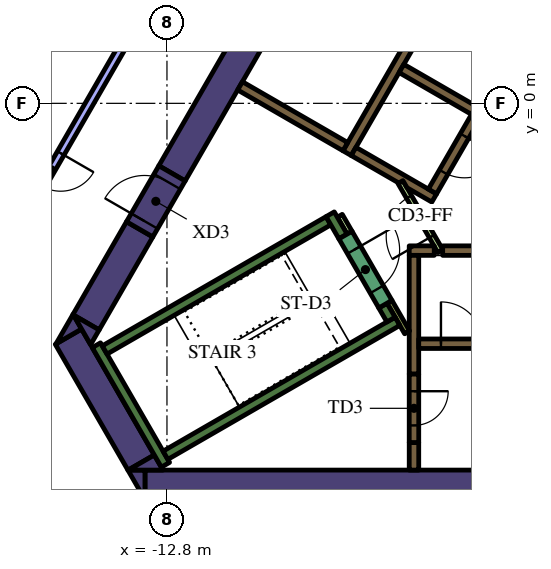
"""IFC4 building model, lengths in metres.
Left out: names, types, materials, properties, quantities, classifications, styles, units other than length and angle.
Written with IfcOpenShell. Run it as: python <this file> out.ifc"""

import sys

from ifc_helpers import new_model, si_unit, direction, frame, frame_2d, origin, place, context, subcontext, project, spatial, polyline, rectangle, outline, extrude, element, fill, save


model = new_model("IFC4")
c1 = context("Model", 3, precision=1e-05, world=origin(), true_north=direction((0.0, 1.0)))
c2 = subcontext(c1, "Body", "Model", "MODEL_VIEW")
j1 = project(units=[si_unit("LENGTHUNIT", "METRE"), si_unit("PLANEANGLEUNIT", "RADIAN")], contexts=[c1])
p1 = place(None, origin())
s1 = spatial("IfcSite", under=j1, at=p1, CompositionType="ELEMENT")
p2 = place(p1, origin())
s2 = spatial("IfcBuilding", under=s1, at=p2, CompositionType="ELEMENT")
p3 = place(p2, frame((0.0, 0.0, 166.8)))
s3 = spatial("IfcBuildingStorey", under=s2, at=p3, CompositionType="ELEMENT", Elevation=166.8)
p4 = place(p3, frame((-13.378, -10.05, 0.0), z_axis=(0.0, 0.0, 1.0), x_axis=(1.0, 0.0, 0.0)))
e1 = element("IfcWall", 1, at=p4, inside=s3, PredefinedType="SOLIDWALL", context=c2, shape_type="SweptSolid", body=[
    extrude(rectangle(XDim=22.282, YDim=0.8, at=frame_2d((11.141, 0.0))), origin(), (0.0, 0.0, 1.0), 4.2),
])
p5 = place(p3, origin())
e2 = element("IfcWall", 2, at=p5, inside=s3, PredefinedType="SOLIDWALL", context=c2, shape_type="SweptSolid", body=[
    extrude(outline(polyline([(-13.828, -9.65), (-13.38, -9.65), (-13.38, -10.426), (-13.828, -9.65)])), origin(), (0.0, 0.0, 1.0), 4.2),
])
p6 = place(p3, frame((-15.392, -6.14, 0.0), z_axis=(0.0, 0.0, 1.0), x_axis=(0.499984020225, -0.866034629516, 0.0)))
e3 = element("IfcWall", 3, at=p6, inside=s3, PredefinedType="SOLIDWALL", context=c2, shape_type="SweptSolid", body=[
    extrude(rectangle(XDim=3.824, YDim=0.8, at=frame_2d((1.912, 0.0))), origin(), (0.0, 0.0, 1.0), 4.2),
])
e4 = element("IfcWall", 4, at=p5, inside=s3, PredefinedType="SOLIDWALL", context=c2, shape_type="SweptSolid", body=[
    extrude(outline(polyline([(-15.047, -5.938), (-15.719, -6.326), (-15.271, -5.55), (-15.047, -5.938)])), origin(), (0.0, 0.0, 1.0), 4.2),
])
e5 = element("IfcWall", 5, at=p5, inside=s3, PredefinedType="SOLIDWALL", context=c2, shape_type="SweptSolid", body=[
    extrude(outline(polyline([(-12.904, -9.65), (-13.82, -9.65), (-13.133, -9.253), (-12.904, -9.65)])), origin(), (0.0, 0.0, 1.0), 4.2),
])
p7 = place(p3, frame((-13.518, -3.314, 0.0), z_axis=(0.0, 0.0, 1.0), x_axis=(-0.499969377405, -0.866043083026, 0.0)))
e6 = element("IfcWall", 6, at=p7, inside=s3, PredefinedType="SOLIDWALL", context=c2, shape_type="SweptSolid", body=[
    extrude(rectangle(XDim=2.824, YDim=0.8, at=frame_2d((1.412, 0.0))), origin(), (0.0, 0.0, 1.0), 4.2),
])
e7 = element("IfcWall", 7, at=p5, inside=s3, PredefinedType="SOLIDWALL", context=c2, shape_type="SweptSolid", body=[
    extrude(outline(polyline([(-14.809, -6.35), (-15.257, -5.574), (-14.585, -5.962), (-14.809, -6.35)])), origin(), (0.0, 0.0, 1.0), 4.2),
])
p8 = place(p3, frame((-12.668, -1.842, 0.0), z_axis=(0.0, 0.0, 1.0), x_axis=(0.500003640647, 0.866023301845, 0.0)))
e8 = element("IfcWall", 8, at=p8, inside=s3, PredefinedType="SOLIDWALL", context=c2, shape_type="SweptSolid", body=[
    extrude(rectangle(XDim=15.858, YDim=0.8, at=frame_2d((7.929, 0.0))), origin(), (0.0, 0.0, 1.0), 4.2),
])
p9 = place(p3, frame((-12.84, -9.511, 0.0), z_axis=(0.0, 0.0, 1.0), x_axis=(-0.499997733992, 0.866026712061, 0.0)))
e9 = element("IfcWall", 9, at=p9, inside=s3, PredefinedType="SOLIDWALL", context=c2, shape_type="SweptSolid", body=[
    extrude(rectangle(XDim=3.634, YDim=0.25, at=frame_2d((1.817, 0.0))), origin(), (0.0, 0.0, 1.0), 4.2),
])
p10 = place(p3, frame((-14.44, -6.49, 0.0), z_axis=(0.0, 0.0, 1.0), x_axis=(0.866022966069, 0.500004222222, 0.0)))
e10 = element("IfcWall", 10, at=p10, inside=s3, PredefinedType="SOLIDWALL", context=c2, shape_type="SweptSolid", body=[
    extrude(rectangle(XDim=6.8, YDim=0.25, at=frame_2d((3.4, 0.0))), origin(), (0.0, 0.0, 1.0), 4.2),
])
p11 = place(p3, frame((-8.168, -3.503, 0.0), z_axis=(0.0, 0.0, 1.0), x_axis=(-0.499952099219, 0.866053057547, 0.0)))
e11 = element("IfcWall", 11, at=p11, inside=s3, PredefinedType="SOLIDWALL", context=c2, shape_type="SweptSolid", body=[
    extrude(rectangle(XDim=0.675, YDim=0.25, at=frame_2d((0.337, 0.0))), origin(), (0.0, 0.0, 1.0), 4.2),
])
p12 = place(p3, frame((-12.84, -9.261, 0.0), z_axis=(0.0, 0.0, 1.0), x_axis=(0.866016039709, 0.500016218704, 0.0)))
e12 = element("IfcWall", 12, at=p12, inside=s3, PredefinedType="SOLIDWALL", context=c2, shape_type="SweptSolid", body=[
    extrude(rectangle(XDim=7.05, YDim=0.25, at=frame_2d((3.525, 0.0))), origin(), (0.0, 0.0, 1.0), 4.2),
])
p13 = place(p3, frame((-6.905, -5.69, 0.0), z_axis=(0.0, 0.0, 1.0), x_axis=(-0.500402024738, 0.865793170242, 0.0)))
e13 = element("IfcWall", 13, at=p13, inside=s3, PredefinedType="SOLIDWALL", context=c2, shape_type="SweptSolid", body=[
    extrude(rectangle(XDim=0.425, YDim=0.25, at=frame_2d((0.212, 0.0))), origin(), (0.0, 0.0, 1.0), 4.2),
])
p14 = place(p3, frame((-6.3, -8.925, 0.0), z_axis=(0.0, 0.0, 1.0), x_axis=(0.0, -1.0, 0.0)))
e14 = element("IfcWall", 14, at=p14, inside=s3, PredefinedType="SOLIDWALL", context=c2, shape_type="SweptSolid", body=[
    extrude(rectangle(XDim=0.725, YDim=0.25, at=frame_2d((0.363, 0.0))), origin(), (0.0, 0.0, 1.0), 4.2),
])
p15 = place(p3, frame((-5.545, -3.875, 0.0), z_axis=(0.0, 0.0, 1.0), x_axis=(1.0, 0.0, 0.0)))
e15 = element("IfcWall", 15, at=p15, inside=s3, PredefinedType="SOLIDWALL", context=c2, shape_type="SweptSolid", body=[
    extrude(rectangle(XDim=11.97, YDim=0.25, at=frame_2d((5.985, 0.0))), origin(), (0.0, 0.0, 1.0), 4.2),
])
p16 = place(p3, frame((-6.425, -3.875, 0.0), z_axis=(0.0, 0.0, 1.0), x_axis=(1.0, 0.0, 0.0)))
e16 = element("IfcWall", 16, at=p16, inside=s3, PredefinedType="SOLIDWALL", context=c2, shape_type="SweptSolid", body=[
    extrude(rectangle(XDim=0.658, YDim=0.25, at=frame_2d((0.329, 0.0))), origin(), (0.0, 0.0, 1.0), 4.2),
])
p17 = place(p3, frame((-6.3, -7.125, 0.0), z_axis=(0.0, 0.0, 1.0), x_axis=(0.0, 1.0, 0.0)))
e17 = element("IfcWall", 17, at=p17, inside=s3, PredefinedType="SOLIDWALL", context=c2, shape_type="SweptSolid", body=[
    extrude(rectangle(XDim=3.125, YDim=0.25, at=frame_2d((1.562, 0.0))), origin(), (0.0, 0.0, 1.0), 4.2),
])
p18 = place(p3, frame((-8.06, -1.311, 0.0), z_axis=(0.0, 0.0, 1.0), x_axis=(0.50000273126, 0.866023826885, 0.0)))
e18 = element("IfcWall", 18, at=p18, inside=s3, PredefinedType="SOLIDWALL", context=c2, shape_type="SweptSolid", body=[
    extrude(rectangle(XDim=10.33, YDim=0.25, at=frame_2d((5.165, 0.0))), origin(), (0.0, 0.0, 1.0), 4.2),
])
p19 = place(p3, frame((-4.724, -0.182, 0.0), z_axis=(0.0, 0.0, 1.0), x_axis=(-0.866008176907, 0.50002983664, 0.0)))
e19 = element("IfcWall", 19, at=p19, inside=s3, PredefinedType="SOLIDWALL", context=c2, shape_type="SweptSolid", body=[
    extrude(rectangle(XDim=2.2, YDim=0.25, at=frame_2d((1.1, 0.0))), origin(), (0.0, 0.0, 1.0), 4.2),
])
e20 = element("IfcWall", 20, at=p5, inside=s3, PredefinedType="SOLIDWALL", context=c2, shape_type="SweptSolid", body=[
    extrude(outline(polyline([(-5.922, -2.257), (-5.922, -2.257), (-5.705, -2.382), (-5.83, -2.598), (-6.483, -2.221), (-6.591, -2.033), (-6.591, -2.033), (-6.7, -2.096), (-7.952, -1.373), (-7.827, -1.156), (-5.922, -2.257)])), origin(), (0.0, 0.0, 1.0), 4.2),
])
p20 = place(p3, frame((-8.106, -1.14, 0.0), z_axis=(0.0, 0.0, 1.0), x_axis=(-0.866008981251, 0.500028443584, 0.0)))
e21 = element("IfcWall", 21, at=p20, inside=s3, PredefinedType="SOLIDWALL", context=c2, shape_type="SweptSolid", body=[
    extrude(rectangle(XDim=3.2, YDim=0.25, at=frame_2d((1.6, 0.0))), origin(), (0.0, 0.0, 1.0), 4.2),
])
p21 = place(p3, frame((-8.252, -2.958, 0.0), z_axis=(0.0, 0.0, 1.0), x_axis=(0.500174715838, -0.865924508047, 0.0)))
e22 = element("IfcWall", 22, at=p21, inside=s3, PredefinedType="PARTITIONING", context=c2, shape_type="SweptSolid", body=[
    extrude(rectangle(XDim=0.514, YDim=0.15, at=frame_2d((0.257, 0.0))), origin(), (0.0, 0.0, 1.0), 3.15),
])
p22 = place(p3, frame((-6.48, -6.027, 0.0), z_axis=(0.0, 0.0, 1.0), x_axis=(-0.499927229454, 0.866067413802, 0.0)))
e23 = element("IfcWall", 23, at=p22, inside=s3, PredefinedType="PARTITIONING", context=c2, shape_type="SweptSolid", body=[
    extrude(rectangle(XDim=0.929, YDim=0.15, at=frame_2d((0.464, 0.0))), origin(), (0.0, 0.0, 1.0), 4.2),
])
p23 = place(p3, frame((-6.175, -6.325, 0.0), z_axis=(0.0, 0.0, 1.0), x_axis=(1.0, 0.0, 0.0)))
e24 = element("IfcWall", 24, at=p23, inside=s3, PredefinedType="SOLIDWALL", context=c2, shape_type="SweptSolid", body=[
    extrude(rectangle(XDim=12.35, YDim=0.25, at=frame_2d((6.175, 0.0))), origin(), (0.0, 0.0, 1.0), 4.2),
])
p24 = place(p23, frame((0.585, 0.0, 0.0)))
e25 = element("IfcOpeningElement", 25, at=p24, cuts=e24, PredefinedType="OPENING", context=c2, shape_type="SweptSolid", body=[
    extrude(rectangle(XDim=1.1, YDim=2.1, at=frame_2d((0.55, 1.05))), frame((0.0, 0.135, 0.0), z_axis=(0.0, -1.0, 0.0), x_axis=(1.0, 0.0, 0.0)), (0.0, 0.0, 1.0), 0.27),
])
p25 = place(p23, frame((3.105, 0.0, 0.0)))
e26 = element("IfcOpeningElement", 26, at=p25, cuts=e24, PredefinedType="OPENING", context=c2, shape_type="SweptSolid", body=[
    extrude(rectangle(XDim=1.1, YDim=2.1, at=frame_2d((0.55, 1.05))), frame((0.0, 0.135, 0.0), z_axis=(0.0, -1.0, 0.0), x_axis=(1.0, 0.0, 0.0)), (0.0, 0.0, 1.0), 0.27),
])
p26 = place(p23, frame((5.625, 0.0, 0.0)))
e27 = element("IfcOpeningElement", 27, at=p26, cuts=e24, PredefinedType="OPENING", context=c2, shape_type="SweptSolid", body=[
    extrude(rectangle(XDim=1.1, YDim=2.1, at=frame_2d((0.55, 1.05))), frame((0.0, 0.135, 0.0), z_axis=(0.0, -1.0, 0.0), x_axis=(1.0, 0.0, 0.0)), (0.0, 0.0, 1.0), 0.27),
])
p27 = place(p23, frame((8.145, 0.0, 0.0)))
e28 = element("IfcOpeningElement", 28, at=p27, cuts=e24, PredefinedType="OPENING", context=c2, shape_type="SweptSolid", body=[
    extrude(rectangle(XDim=1.1, YDim=2.1, at=frame_2d((0.55, 1.05))), frame((0.0, 0.135, 0.0), z_axis=(0.0, -1.0, 0.0), x_axis=(1.0, 0.0, 0.0)), (0.0, 0.0, 1.0), 0.27),
])
p28 = place(p23, frame((10.665, 0.0, 0.0)))
e29 = element("IfcOpeningElement", 29, at=p28, cuts=e24, PredefinedType="OPENING", context=c2, shape_type="SweptSolid", body=[
    extrude(rectangle(XDim=1.1, YDim=2.1, at=frame_2d((0.55, 1.05))), frame((0.0, 0.135, 0.0), z_axis=(0.0, -1.0, 0.0), x_axis=(1.0, 0.0, 0.0)), (0.0, 0.0, 1.0), 0.27),
])
p29 = place(p3, frame((-0.898, 6.194, 0.0), z_axis=(0.0, 0.0, 1.0), x_axis=(-0.499996202215, -0.866027596426, 0.0)))
e30 = element("IfcWall", 30, at=p29, inside=s3, PredefinedType="SOLIDWALL", context=c2, shape_type="SweptSolid", body=[
    extrude(rectangle(XDim=9.83, YDim=0.25, at=frame_2d((4.915, 0.0))), origin(), (0.0, 0.0, 1.0), 4.2),
])
p30 = place(p29, frame((0.585, 0.0, 0.0)))
e31 = element("IfcOpeningElement", 31, at=p30, cuts=e30, PredefinedType="OPENING", context=c2, shape_type="SweptSolid", body=[
    extrude(rectangle(XDim=1.1, YDim=2.1, at=frame_2d((0.55, 1.05))), frame((0.0, 0.135, 0.0), z_axis=(0.0, -1.0, 0.0), x_axis=(1.0, 0.0, 0.0)), (0.0, 0.0, 1.0), 0.27),
])
p31 = place(p29, frame((3.105, 0.0, 0.0)))
e32 = element("IfcOpeningElement", 32, at=p31, cuts=e30, PredefinedType="OPENING", context=c2, shape_type="SweptSolid", body=[
    extrude(rectangle(XDim=1.1, YDim=2.1, at=frame_2d((0.55, 1.05))), frame((0.0, 0.135, 0.0), z_axis=(0.0, -1.0, 0.0), x_axis=(1.0, 0.0, 0.0)), (0.0, 0.0, 1.0), 0.27),
])
p32 = place(p29, frame((5.625, 0.0, 0.0)))
e33 = element("IfcOpeningElement", 33, at=p32, cuts=e30, PredefinedType="OPENING", context=c2, shape_type="SweptSolid", body=[
    extrude(rectangle(XDim=1.1, YDim=2.1, at=frame_2d((0.55, 1.05))), frame((0.0, 0.135, 0.0), z_axis=(0.0, -1.0, 0.0), x_axis=(1.0, 0.0, 0.0)), (0.0, 0.0, 1.0), 0.27),
])
p33 = place(p29, frame((8.145, 0.0, 0.0)))
e34 = element("IfcOpeningElement", 34, at=p33, cuts=e30, PredefinedType="OPENING", context=c2, shape_type="SweptSolid", body=[
    extrude(rectangle(XDim=1.1, YDim=2.1, at=frame_2d((0.55, 1.05))), frame((0.0, 0.135, 0.0), z_axis=(0.0, -1.0, 0.0), x_axis=(1.0, 0.0, 0.0)), (0.0, 0.0, 1.0), 0.27),
])
p34 = place(p3, frame((-8.103, -3.466, 0.0), z_axis=(0.0, 0.0, 1.0), x_axis=(0.500078061341, -0.865980330357, 0.0)))
e35 = element("IfcWall", 35, at=p34, inside=s3, PredefinedType="SOLIDWALL", context=c2, shape_type="SweptSolid", body=[
    extrude(rectangle(XDim=2.1, YDim=0.4, at=frame_2d((1.05, 0.0))), origin(), (0.0, 0.0, 1.0), 4.2),
])
p35 = place(p34, frame((0.45, 0.0, 0.0)))
e36 = element("IfcOpeningElement", 36, at=p35, cuts=e35, PredefinedType="OPENING", context=c2, shape_type="SweptSolid", body=[
    extrude(rectangle(XDim=1.2, YDim=2.1, at=frame_2d((0.6, 1.05))), frame((0.0, 0.21, 0.0), z_axis=(0.0, -1.0, 0.0), x_axis=(1.0, 0.0, 0.0)), (0.0, 0.0, 1.0), 0.42),
])
p36 = place(p3, frame((-6.3, -7.125, 0.0), z_axis=(0.0, 0.0, 1.0), x_axis=(0.0, -1.0, 0.0)))
e37 = element("IfcWall", 37, at=p36, inside=s3, PredefinedType="SOLIDWALL", context=c2, shape_type="SweptSolid", body=[
    extrude(rectangle(XDim=1.8, YDim=0.25, at=frame_2d((0.9, 0.0))), origin(), (0.0, 0.0, 1.0), 4.2),
])
p37 = place(p36, frame((0.45, 0.0, 0.0)))
e38 = element("IfcOpeningElement", 38, at=p37, cuts=e37, PredefinedType="OPENING", context=c2, shape_type="SweptSolid", body=[
    extrude(rectangle(XDim=0.9, YDim=2.1, at=frame_2d((0.45, 1.05))), frame((0.0, 0.135, 0.0), z_axis=(0.0, -1.0, 0.0), x_axis=(1.0, 0.0, 0.0)), (0.0, 0.0, 1.0), 0.27),
])
p38 = place(p3, frame((-5.606, -3.89, 0.0), z_axis=(0.0, 0.0, 1.0), x_axis=(-0.500027713859, 0.866009402589, 0.0)))
e39 = element("IfcWall", 39, at=p38, inside=s3, PredefinedType="PARTITIONING", context=c2, shape_type="SweptSolid", body=[
    extrude(rectangle(XDim=2.1, YDim=0.15, at=frame_2d((1.05, 0.0))), origin(), (0.0, 0.0, 1.0), 3.15),
])
p39 = place(p38, frame((0.45, 0.0, 0.0)))
e40 = element("IfcOpeningElement", 40, at=p39, cuts=e39, PredefinedType="OPENING", context=c2, shape_type="SweptSolid", body=[
    extrude(rectangle(XDim=1.2, YDim=2.1, at=frame_2d((0.6, 1.05))), frame((0.0, 0.085, 0.0), z_axis=(0.0, -1.0, 0.0), x_axis=(1.0, 0.0, 0.0)), (0.0, 0.0, 1.0), 0.17),
])
p40 = place(p3, frame((-13.518, -3.314, 0.0), z_axis=(0.0, 0.0, 1.0), x_axis=(0.500000056704, 0.866025371046, 0.0)))
e41 = element("IfcWall", 41, at=p40, inside=s3, PredefinedType="SOLIDWALL", context=c2, shape_type="SweptSolid", body=[
    extrude(rectangle(XDim=1.7, YDim=0.8, at=frame_2d((0.85, 0.0))), origin(), (0.0, 0.0, 1.0), 4.2),
])
p41 = place(p40, frame((0.25, 0.0, 0.0)))
e42 = element("IfcOpeningElement", 42, at=p41, cuts=e41, PredefinedType="OPENING", context=c2, shape_type="SweptSolid", body=[
    extrude(rectangle(XDim=1.2, YDim=2.1, at=frame_2d((0.6, 1.05))), frame((0.0, 0.41, 0.0), z_axis=(0.0, -1.0, 0.0), x_axis=(1.0, 0.0, 0.0)), (0.0, 0.0, 1.0), 0.82),
])
p42 = place(p3, frame((-13.146, 2.931, 0.0), z_axis=(0.0, 0.0, 1.0), x_axis=(-0.499997861235, -0.866026638597, 0.0)))
e43 = element("IfcWall", 43, at=p42, inside=s3, PredefinedType="PARTITIONING", context=c2, shape_type="SweptSolid", body=[
    extrude(rectangle(XDim=10.717, YDim=0.2, at=frame_2d((5.359, 0.0))), origin(), (0.0, 0.0, 1.0), 3.15),
])
p43 = place(p42, frame((4.9, 0.0, 0.0)))
e44 = element("IfcOpeningElement", 44, at=p43, cuts=e43, PredefinedType="OPENING", context=c2, shape_type="SweptSolid", body=[
    extrude(rectangle(XDim=1.0, YDim=2.1, at=frame_2d((0.5, 1.05))), frame((0.0, 0.11, 0.0), z_axis=(0.0, -1.0, 0.0), x_axis=(1.0, 0.0, 0.0)), (0.0, 0.0, 1.0), 0.22),
])
p44 = place(p3, frame((-18.489, -6.376, 0.0), z_axis=(0.0, 0.0, 1.0), x_axis=(0.499989401968, -0.866031522475, 0.0)))
e45 = element("IfcWall", 45, at=p44, inside=s3, PredefinedType="PARTITIONING", context=c2, shape_type="SweptSolid", body=[
    extrude(rectangle(XDim=6.677, YDim=0.2, at=frame_2d((3.338, 0.0))), origin(), (0.0, 0.0, 1.0), 3.15),
])
p45 = place(p24, origin())
e46 = element("IfcDoor", 46, at=p45, inside=s3, OperationType="DOUBLE_DOOR_SLIDING", PredefinedType="DOOR", context=c2, shape_type="SweptSolid", body=[
    extrude(rectangle(XDim=1.1, YDim=2.1, at=frame_2d((0.55, 1.05))), frame((0.0, 0.025, 0.0), z_axis=(0.0, -1.0, 0.0), x_axis=(1.0, 0.0, 0.0)), (0.0, 0.0, 1.0), 0.05),
])
fill(e25, e46)
p46 = place(p33, origin())
e47 = element("IfcDoor", 47, at=p46, inside=s3, OperationType="DOUBLE_DOOR_SLIDING", PredefinedType="DOOR", context=c2, shape_type="SweptSolid", body=[
    extrude(rectangle(XDim=1.1, YDim=2.1, at=frame_2d((0.55, 1.05))), frame((0.0, 0.025, 0.0), z_axis=(0.0, -1.0, 0.0), x_axis=(1.0, 0.0, 0.0)), (0.0, 0.0, 1.0), 0.05),
])
fill(e34, e47)
p47 = place(p35, origin())
e48 = element("IfcDoor", 48, at=p47, inside=s3, OperationType="SINGLE_SWING_LEFT", PredefinedType="DOOR", context=c2, shape_type="SweptSolid", body=[
    extrude(rectangle(XDim=1.2, YDim=2.1, at=frame_2d((0.6, 1.05))), frame((0.0, 0.025, 0.0), z_axis=(0.0, -1.0, 0.0), x_axis=(1.0, 0.0, 0.0)), (0.0, 0.0, 1.0), 0.05),
])
fill(e36, e48)
p48 = place(p37, origin())
e49 = element("IfcDoor", 49, at=p48, inside=s3, OperationType="SINGLE_SWING_LEFT", PredefinedType="DOOR", context=c2, shape_type="SweptSolid", body=[
    extrude(rectangle(XDim=0.9, YDim=2.1, at=frame_2d((0.45, 1.05))), frame((0.0, 0.025, 0.0), z_axis=(0.0, -1.0, 0.0), x_axis=(1.0, 0.0, 0.0)), (0.0, 0.0, 1.0), 0.05),
])
fill(e38, e49)
p49 = place(p39, origin())
e50 = element("IfcDoor", 50, at=p49, inside=s3, OperationType="SINGLE_SWING_LEFT", PredefinedType="DOOR", context=c2, shape_type="SweptSolid", body=[
    extrude(rectangle(XDim=1.2, YDim=2.1, at=frame_2d((0.6, 1.05))), frame((0.0, 0.025, 0.0), z_axis=(0.0, -1.0, 0.0), x_axis=(1.0, 0.0, 0.0)), (0.0, 0.0, 1.0), 0.05),
])
fill(e40, e50)
p50 = place(p41, origin())
e51 = element("IfcDoor", 51, at=p50, inside=s3, OperationType="SINGLE_SWING_LEFT", PredefinedType="DOOR", context=c2, shape_type="SweptSolid", body=[
    extrude(rectangle(XDim=1.2, YDim=2.1, at=frame_2d((0.6, 1.05))), frame((0.0, 0.025, 0.0), z_axis=(0.0, -1.0, 0.0), x_axis=(1.0, 0.0, 0.0)), (0.0, 0.0, 1.0), 0.05),
])
fill(e42, e51)
p51 = place(p43, origin())
e52 = element("IfcDoor", 52, at=p51, inside=s3, OperationType="SINGLE_SWING_RIGHT", PredefinedType="DOOR", context=c2, shape_type="SweptSolid", body=[
    extrude(rectangle(XDim=1.0, YDim=2.1, at=frame_2d((0.5, 1.05))), frame((0.0, 0.025, 0.0), z_axis=(0.0, -1.0, 0.0), x_axis=(1.0, 0.0, 0.0)), (0.0, 0.0, 1.0), 0.05),
])
fill(e44, e52)
save(model, sys.argv[1])
